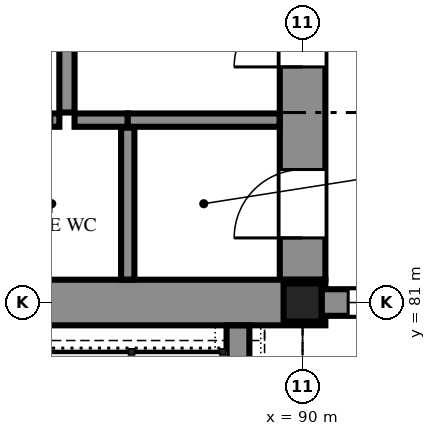
"""IFC4 building model, lengths in metres.
Left out: names, types, materials, properties, quantities, classifications, styles, units other than length and angle.
Written with IfcOpenShell. Run it as: python <this file> out.ifc"""

import sys

from ifc_helpers import new_model, si_unit, direction, frame, frame_2d, origin, origin_2d, place, context, subcontext, project, spatial, polyline, rectangle, hollow_rectangle, outline, extrude, element, fill, save


model = new_model("IFC4")
c1 = context("Model", 3, precision=1e-05, world=origin(), true_north=direction((0.0, 1.0)))
c2 = subcontext(c1, "Body", "Model", "MODEL_VIEW")
j1 = project(units=[si_unit("LENGTHUNIT", "METRE"), si_unit("PLANEANGLEUNIT", "RADIAN")], contexts=[c1])
p1 = place(None, origin())
s1 = spatial("IfcSite", under=j1, at=p1, CompositionType="ELEMENT")
p2 = place(p1, origin())
s2 = spatial("IfcBuilding", under=s1, at=p2, CompositionType="ELEMENT")
p3 = place(p2, origin())
s3 = spatial("IfcBuildingStorey", under=s2, at=p3, CompositionType="ELEMENT", Elevation=0.0)
p4 = place(p3, frame((90.0, 81.0, -2.1), z_axis=(0.0, 0.0, 1.0), x_axis=(1.0, 0.0, 0.0)))
e1 = element("IfcColumn", 1, at=p4, inside=s3, PredefinedType="COLUMN", context=c2, shape_type="SweptSolid", body=[
    extrude(hollow_rectangle(XDim=0.5, YDim=0.5, WallThickness=0.032, at=origin_2d()), origin(), (0.0, 0.0, 1.0), 9.6),
])
p5 = place(p3, frame((71.7, 81.0, -2.1), z_axis=(0.0, 0.0, 1.0), x_axis=(1.0, 0.0, 0.0)))
e2 = element("IfcWall", 2, at=p5, inside=s3, PredefinedType="SOLIDWALL", context=c2, shape_type="SweptSolid", body=[
    extrude(rectangle(XDim=18.6, YDim=0.6, at=frame_2d((9.3, 0.0))), origin(), (0.0, 0.0, 1.0), 9.6),
])
p6 = place(p5, frame((1.6, 0.0, 2.1)))
e3 = element("IfcOpeningElement", 3, at=p6, cuts=e2, PredefinedType="OPENING", context=c2, shape_type="SweptSolid", body=[
    extrude(rectangle(XDim=1.8, YDim=2.1, at=frame_2d((0.9, 1.05))), frame((0.0, 0.31, 0.0), z_axis=(0.0, -1.0, 0.0), x_axis=(1.0, 0.0, 0.0)), (0.0, 0.0, 1.0), 0.62),
])
p7 = place(p5, frame((5.6, 0.0, 2.1)))
e4 = element("IfcOpeningElement", 4, at=p7, cuts=e2, PredefinedType="OPENING", context=c2, shape_type="SweptSolid", body=[
    extrude(rectangle(XDim=1.8, YDim=2.1, at=frame_2d((0.9, 1.05))), frame((0.0, 0.31, 0.0), z_axis=(0.0, -1.0, 0.0), x_axis=(1.0, 0.0, 0.0)), (0.0, 0.0, 1.0), 0.62),
])
p8 = place(p5, frame((9.1, 0.0, 2.1)))
e5 = element("IfcOpeningElement", 5, at=p8, cuts=e2, PredefinedType="OPENING", context=c2, shape_type="SweptSolid", body=[
    extrude(rectangle(XDim=1.8, YDim=2.1, at=frame_2d((0.9, 1.05))), frame((0.0, 0.31, 0.0), z_axis=(0.0, -1.0, 0.0), x_axis=(1.0, 0.0, 0.0)), (0.0, 0.0, 1.0), 0.62),
])
p9 = place(p3, frame((90.0, 81.3, -2.1), z_axis=(0.0, 0.0, 1.0), x_axis=(0.0, 1.0, 0.0)))
e6 = element("IfcWall", 6, at=p9, inside=s3, PredefinedType="SOLIDWALL", context=c2, shape_type="SweptSolid", body=[
    extrude(rectangle(XDim=8.4, YDim=0.6, at=frame_2d((4.2, 0.0))), origin(), (0.0, 0.0, 1.0), 9.6),
])
p10 = place(p9, frame((2.8, 0.0, 2.1)))
e7 = element("IfcOpeningElement", 7, at=p10, cuts=e6, PredefinedType="OPENING", context=c2, shape_type="SweptSolid", body=[
    extrude(rectangle(XDim=1.8, YDim=2.1, at=frame_2d((0.9, 1.05))), frame((0.0, 0.31, 0.0), z_axis=(0.0, -1.0, 0.0), x_axis=(1.0, 0.0, 0.0)), (0.0, 0.0, 1.0), 0.62),
])
p11 = place(p9, frame((0.55, 0.0, 2.1)))
e8 = element("IfcOpeningElement", 8, at=p11, cuts=e6, PredefinedType="OPENING", context=c2, shape_type="SweptSolid", body=[
    extrude(rectangle(XDim=0.9, YDim=2.1, at=frame_2d((0.45, 1.05))), frame((0.0, 0.31, 0.0), z_axis=(0.0, -1.0, 0.0), x_axis=(1.0, 0.0, 0.0)), (0.0, 0.0, 1.0), 0.62),
])
p12 = place(p3, frame((90.25, 81.0, 0.0), z_axis=(0.0, 0.0, 1.0), x_axis=(1.0, 0.0, 0.0)))
e9 = element("IfcWall", 9, at=p12, inside=s3, PredefinedType="SOLIDWALL", context=c2, shape_type="SweptSolid", body=[
    extrude(rectangle(XDim=8.395, YDim=0.35, at=frame_2d((4.197, 0.0))), origin(), (0.0, 0.0, 1.0), 6.692),
])
p13 = place(p12, frame((3.05, 0.0, 0.0)))
e10 = element("IfcOpeningElement", 10, at=p13, cuts=e9, PredefinedType="OPENING", context=c2, shape_type="SweptSolid", body=[
    extrude(rectangle(XDim=2.4, YDim=3.0, at=frame_2d((1.2, 1.5))), frame((0.0, 0.185, 0.0), z_axis=(0.0, -1.0, 0.0), x_axis=(1.0, 0.0, 0.0)), (0.0, 0.0, 1.0), 0.37),
])
p14 = place(p12, frame((0.35, 0.0, 0.9)))
e11 = element("IfcOpeningElement", 11, at=p14, cuts=e9, PredefinedType="OPENING", context=c2, shape_type="SweptSolid", body=[
    extrude(rectangle(XDim=1.8, YDim=3.6, at=frame_2d((0.9, 1.8))), frame((0.0, 0.185, 0.0), z_axis=(0.0, -1.0, 0.0), x_axis=(1.0, 0.0, 0.0)), (0.0, 0.0, 1.0), 0.37),
])
p15 = place(p12, frame((6.35, 0.0, 0.9)))
e12 = element("IfcOpeningElement", 12, at=p15, cuts=e9, PredefinedType="OPENING", context=c2, shape_type="SweptSolid", body=[
    extrude(rectangle(XDim=1.8, YDim=3.6, at=frame_2d((0.9, 1.8))), frame((0.0, 0.185, 0.0), z_axis=(0.0, -1.0, 0.0), x_axis=(1.0, 0.0, 0.0)), (0.0, 0.0, 1.0), 0.37),
])
p16 = place(p3, frame((89.15, 72.6, 0.0), z_axis=(0.0, 0.0, 1.0), x_axis=(0.0, 1.0, 0.0)))
e13 = element("IfcWall", 13, at=p16, inside=s3, PredefinedType="SOLIDWALL", context=c2, shape_type="SweptSolid", body=[
    extrude(rectangle(XDim=8.098, YDim=0.3, at=frame_2d((4.049, 0.0))), origin(), (0.0, 0.0, 1.0), 6.902),
])
p17 = place(p3, frame((86.8, 83.4, 0.0), z_axis=(0.0, 0.0, 1.0), x_axis=(-1.0, 0.0, 0.0)))
e14 = element("IfcWall", 14, at=p17, inside=s3, PredefinedType="PARTITIONING", context=c2, shape_type="SweptSolid", body=[
    extrude(rectangle(XDim=1.1, YDim=0.175, at=frame_2d((0.55, 0.0))), origin(), (0.0, 0.0, 1.0), 6.459),
])
p18 = place(p17, frame((0.1, 0.0, 0.0)))
e15 = element("IfcOpeningElement", 15, at=p18, cuts=e14, PredefinedType="OPENING", context=c2, shape_type="SweptSolid", body=[
    extrude(rectangle(XDim=0.9, YDim=2.1, at=frame_2d((0.45, 1.05))), frame((0.0, 0.097, 0.0), z_axis=(0.0, -1.0, 0.0), x_axis=(1.0, 0.0, 0.0)), (0.0, 0.0, 1.0), 0.195),
])
p19 = place(p3, frame((86.9, 86.6, 0.0), z_axis=(0.0, 0.0, 1.0), x_axis=(0.0, -1.0, 0.0)))
e16 = element("IfcWall", 16, at=p19, inside=s3, PredefinedType="PARTITIONING", context=c2, shape_type="SweptSolid", body=[
    extrude(rectangle(XDim=3.1, YDim=0.2, at=frame_2d((1.55, 0.0))), origin(), (0.0, 0.0, 1.0), 6.6),
])
p20 = place(p19, frame((1.0, 0.0, 0.0)))
e17 = element("IfcOpeningElement", 17, at=p20, cuts=e16, PredefinedType="OPENING", context=c2, shape_type="SweptSolid", body=[
    extrude(rectangle(XDim=1.2, YDim=2.1, at=frame_2d((0.6, 1.05))), frame((0.0, 0.11, 0.0), z_axis=(0.0, -1.0, 0.0), x_axis=(1.0, 0.0, 0.0)), (0.0, 0.0, 1.0), 0.22),
])
p21 = place(p3, frame((87.7, 83.4, 0.0), z_axis=(0.0, 0.0, 1.0), x_axis=(-1.0, 0.0, 0.0)))
e18 = element("IfcWall", 18, at=p21, inside=s3, PredefinedType="PARTITIONING", context=c2, shape_type="SweptSolid", body=[
    extrude(rectangle(XDim=0.7, YDim=0.175, at=frame_2d((0.35, 0.0))), origin(), (0.0, 0.0, 1.0), 6.459),
])
for number, where, z_axis, x_axis in (
    (19, (89.698, 83.4, 0.0), (0.0, 0.0, 1.0), (-1.0, 0.0, 0.0)),
    (20, (87.7, 83.3, 0.0), (0.0, 0.0, 1.0), (0.0, -1.0, 0.0)),
):
    element("IfcWall", number, at=place(p3, frame(where, z_axis=z_axis, x_axis=x_axis)), inside=s3, PredefinedType="PARTITIONING", context=c2, shape_type="SweptSolid", body=[
        extrude(rectangle(XDim=1.998, YDim=0.175, at=frame_2d((0.999, 0.0))), origin(), (0.0, 0.0, 1.0), 6.459),
    ])
p22 = place(p14, origin())
e21 = element("IfcWindow", 21, at=p22, inside=s3, PartitioningType="TRIPLE_PANEL_HORIZONTAL", PredefinedType="WINDOW", context=c2, shape_type="SweptSolid", body=[
    extrude(outline(polyline([(0.0, 0.0), (1.8, 0.0), (1.8, 3.6), (0.0, 3.6), (0.0, 0.0)]), holes=[polyline([(0.07, 0.07), (1.73, 0.07), (1.73, 3.53), (0.07, 3.53), (0.07, 0.07)])]), frame((0.0, 0.03, 0.0), z_axis=(0.0, -1.0, 0.0), x_axis=(1.0, 0.0, 0.0)), (0.0, 0.0, 1.0), 0.06),
    extrude(rectangle(XDim=1.66, YDim=0.04, at=frame_2d((0.9, 1.217))), frame((0.0, 0.021, 0.0), z_axis=(0.0, -1.0, 0.0), x_axis=(1.0, 0.0, 0.0)), (0.0, 0.0, 1.0), 0.043),
    extrude(rectangle(XDim=1.66, YDim=0.04, at=frame_2d((0.9, 2.383))), frame((0.0, 0.021, 0.0), z_axis=(0.0, -1.0, 0.0), x_axis=(1.0, 0.0, 0.0)), (0.0, 0.0, 1.0), 0.043),
    extrude(outline(polyline([(0.07, 0.07), (1.73, 0.07), (1.73, 1.197), (0.07, 1.197), (0.07, 0.07)]), holes=[polyline([(0.1, 0.1), (1.7, 0.1), (1.7, 1.167), (0.1, 1.167), (0.1, 0.1)])]), frame((0.0, 0.022, 0.0), z_axis=(0.0, -1.0, 0.0), x_axis=(1.0, 0.0, 0.0)), (0.0, 0.0, 1.0), 0.045),
    extrude(rectangle(XDim=1.6, YDim=1.067, at=frame_2d((0.9, 0.633))), frame((0.0, 0.006, 0.0), z_axis=(0.0, -1.0, 0.0), x_axis=(1.0, 0.0, 0.0)), (0.0, 0.0, 1.0), 0.012),
    extrude(outline(polyline([(0.07, 1.237), (1.73, 1.237), (1.73, 2.363), (0.07, 2.363), (0.07, 1.237)]), holes=[polyline([(0.1, 1.267), (1.7, 1.267), (1.7, 2.333), (0.1, 2.333), (0.1, 1.267)])]), frame((0.0, 0.022, 0.0), z_axis=(0.0, -1.0, 0.0), x_axis=(1.0, 0.0, 0.0)), (0.0, 0.0, 1.0), 0.045),
    extrude(rectangle(XDim=1.6, YDim=1.066, at=frame_2d((0.9, 1.8))), frame((0.0, 0.006, 0.0), z_axis=(0.0, -1.0, 0.0), x_axis=(1.0, 0.0, 0.0)), (0.0, 0.0, 1.0), 0.012),
    extrude(outline(polyline([(0.07, 2.403), (1.73, 2.403), (1.73, 3.53), (0.07, 3.53), (0.07, 2.403)]), holes=[polyline([(0.1, 2.433), (1.7, 2.433), (1.7, 3.5), (0.1, 3.5), (0.1, 2.433)])]), frame((0.0, 0.022, 0.0), z_axis=(0.0, -1.0, 0.0), x_axis=(1.0, 0.0, 0.0)), (0.0, 0.0, 1.0), 0.045),
    extrude(rectangle(XDim=1.6, YDim=1.067, at=frame_2d((0.9, 2.967))), frame((0.0, 0.006, 0.0), z_axis=(0.0, -1.0, 0.0), x_axis=(1.0, 0.0, 0.0)), (0.0, 0.0, 1.0), 0.012),
])
fill(e11, e21)
p23 = place(p10, origin())
e22 = element("IfcDoor", 22, at=p23, inside=s3, OperationType="DOUBLE_DOOR_SINGLE_SWING", PredefinedType="DOOR", context=c2, shape_type="SweptSolid", body=[
    extrude(outline(polyline([(0.0, 0.0), (0.07, 0.0), (0.07, 2.03), (1.73, 2.03), (1.73, 0.0), (1.8, 0.0), (1.8, 2.1), (0.0, 2.1), (0.0, 0.0)])), frame((0.0, 0.025, 0.0), z_axis=(0.0, -1.0, 0.0), x_axis=(1.0, 0.0, 0.0)), (0.0, 0.0, 1.0), 0.05),
    extrude(outline(polyline([(0.074, 0.01), (0.897, 0.01), (0.897, 2.026), (0.074, 2.026), (0.074, 0.01)]), holes=[polyline([(0.194, 0.16), (0.777, 0.16), (0.777, 1.01), (0.194, 1.01), (0.194, 0.16)]), polyline([(0.335, 1.16), (0.635, 1.16), (0.635, 1.76), (0.335, 1.76), (0.335, 1.16)])]), frame((0.0, 0.017, 0.0), z_axis=(0.0, -1.0, 0.0), x_axis=(1.0, 0.0, 0.0)), (0.0, 0.0, 1.0), 0.035),
    extrude(rectangle(XDim=0.583, YDim=0.85, at=frame_2d((0.485, 0.585))), frame((0.0, 0.009, 0.0), z_axis=(0.0, -1.0, 0.0), x_axis=(1.0, 0.0, 0.0)), (0.0, 0.0, 1.0), 0.017),
    extrude(rectangle(XDim=0.3, YDim=0.6, at=frame_2d((0.485, 1.46))), frame((0.0, 0.006, 0.0), z_axis=(0.0, -1.0, 0.0), x_axis=(1.0, 0.0, 0.0)), (0.0, 0.0, 1.0), 0.012),
    extrude(outline(polyline([(0.903, 0.01), (1.726, 0.01), (1.726, 2.026), (0.903, 2.026), (0.903, 0.01)]), holes=[polyline([(1.023, 0.16), (1.606, 0.16), (1.606, 1.01), (1.023, 1.01), (1.023, 0.16)]), polyline([(1.165, 1.16), (1.465, 1.16), (1.465, 1.76), (1.165, 1.76), (1.165, 1.16)])]), frame((0.0, 0.017, 0.0), z_axis=(0.0, -1.0, 0.0), x_axis=(1.0, 0.0, 0.0)), (0.0, 0.0, 1.0), 0.035),
    extrude(rectangle(XDim=0.583, YDim=0.85, at=frame_2d((1.314, 0.585))), frame((0.0, 0.009, 0.0), z_axis=(0.0, -1.0, 0.0), x_axis=(1.0, 0.0, 0.0)), (0.0, 0.0, 1.0), 0.017),
    extrude(rectangle(XDim=0.3, YDim=0.6, at=frame_2d((1.314, 1.46))), frame((0.0, 0.006, 0.0), z_axis=(0.0, -1.0, 0.0), x_axis=(1.0, 0.0, 0.0)), (0.0, 0.0, 1.0), 0.012),
])
fill(e7, e22)
p24 = place(p11, origin())
e23 = element("IfcDoor", 23, at=p24, inside=s3, OperationType="SINGLE_SWING_LEFT", PredefinedType="DOOR", context=c2, shape_type="SweptSolid", body=[
    extrude(outline(polyline([(0.0, 0.0), (0.07, 0.0), (0.07, 2.03), (0.83, 2.03), (0.83, 0.0), (0.9, 0.0), (0.9, 2.1), (0.0, 2.1), (0.0, 0.0)])), frame((0.0, 0.025, 0.0), z_axis=(0.0, -1.0, 0.0), x_axis=(1.0, 0.0, 0.0)), (0.0, 0.0, 1.0), 0.05),
    extrude(outline(polyline([(0.074, 0.01), (0.826, 0.01), (0.826, 2.026), (0.074, 2.026), (0.074, 0.01)]), holes=[polyline([(0.194, 0.16), (0.706, 0.16), (0.706, 1.01), (0.194, 1.01), (0.194, 0.16)]), polyline([(0.3, 1.16), (0.6, 1.16), (0.6, 1.76), (0.3, 1.76), (0.3, 1.16)])]), frame((0.0, 0.017, 0.0), z_axis=(0.0, -1.0, 0.0), x_axis=(1.0, 0.0, 0.0)), (0.0, 0.0, 1.0), 0.035),
    extrude(rectangle(XDim=0.512, YDim=0.85, at=frame_2d((0.45, 0.585))), frame((0.0, 0.009, 0.0), z_axis=(0.0, -1.0, 0.0), x_axis=(1.0, 0.0, 0.0)), (0.0, 0.0, 1.0), 0.017),
    extrude(rectangle(XDim=0.3, YDim=0.6, at=frame_2d((0.45, 1.46))), frame((0.0, 0.006, 0.0), z_axis=(0.0, -1.0, 0.0), x_axis=(1.0, 0.0, 0.0)), (0.0, 0.0, 1.0), 0.012),
])
fill(e8, e23)
save(model, sys.argv[1])
